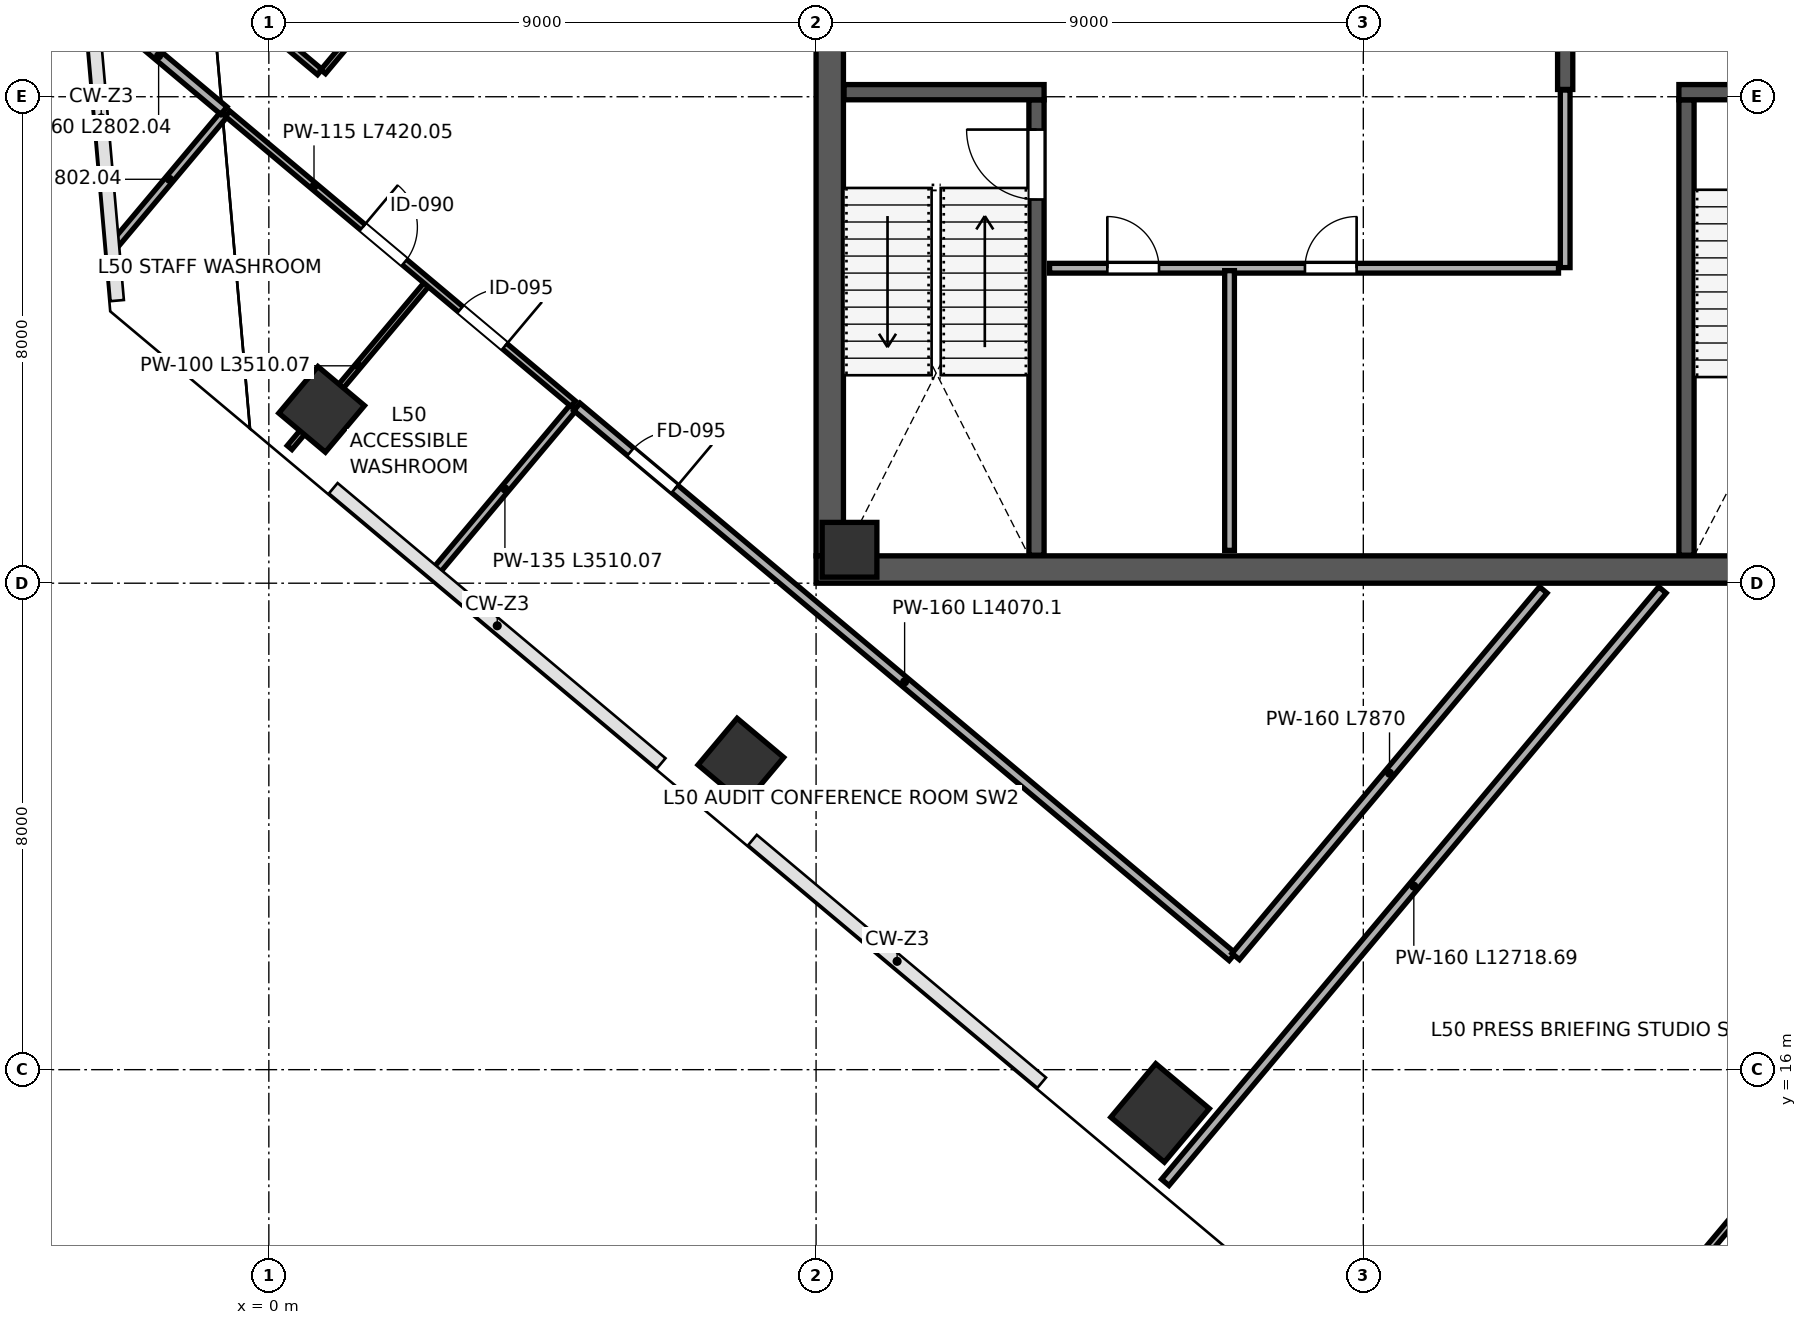
"""IFC4 building model, lengths in metres.
Left out: names, types, materials, properties, quantities, classifications, styles, units other than length and angle.
Written with IfcOpenShell. Run it as: python <this file> out.ifc"""

import sys

from ifc_helpers import new_model, si_unit, direction, frame, frame_2d, origin, origin_2d, place, context, subcontext, project, spatial, rectangle, extrude, clip, halfspace, source, transform, mapped, element, fill, save


model = new_model("IFC4")
c1 = context("Model", 3, precision=1e-05, world=origin(), true_north=direction((0.0, 1.0)))
c2 = subcontext(c1, "Body", "Model", "MODEL_VIEW")
j1 = project(units=[si_unit("LENGTHUNIT", "METRE"), si_unit("PLANEANGLEUNIT", "RADIAN")], contexts=[c1])
p1 = place(None, origin())
s1 = spatial("IfcSite", under=j1, at=p1, CompositionType="ELEMENT")
p2 = place(p1, origin())
s2 = spatial("IfcBuilding", under=s1, at=p2, CompositionType="ELEMENT")
p3 = place(p2, frame((0.0, 0.0, 224.8)))
s3 = spatial("IfcBuildingStorey", under=s2, at=p3, CompositionType="ELEMENT", Elevation=224.8)
m1 = source(origin(), c2, "Body", "SweptSolid", [
    extrude(rectangle(XDim=0.9, YDim=0.9, at=origin_2d()), origin(), (0.0, 0.0, 1.0), 4.198),
])
p4 = place(p3, frame((9.55, 24.55, 0.001), z_axis=(0.0, 0.0, 1.0), x_axis=(1.0, 0.0, 0.0)))
e1 = element("IfcColumn", 1, at=p4, inside=s3, PredefinedType="COLUMN", context=c2, shape_type="MappedRepresentation", body=[
    mapped(m1, transform((0.0, 0.0, 0.0), scale=1.0)),
])
p5 = place(p3, frame((0.868, 26.859, 0.0), z_axis=(-0.047566065754, 0.210357803919, 0.976466621917), x_axis=(0.885612426961, -0.443252303304, 0.138629090847)))
e2 = element("IfcColumn", 2, at=p5, inside=s3, PredefinedType="COLUMN", context=c2, shape_type="Clipping", body=[
    clip(clip(extrude(rectangle(XDim=1.0, YDim=1.0, at=origin_2d()), origin(), (0.0, 0.0, 1.0), 4.301), halfspace(frame((0.0, 0.0, 0.156), z_axis=(0.0, 0.0, -1.0), x_axis=(1.0, 0.0, 0.0)), False)), halfspace(frame((0.0, 0.0, 4.145), z_axis=(0.0, 0.0, 1.0), x_axis=(1.0, 0.0, 0.0)), False)),
])
p6 = place(p3, frame((7.763, 21.074, 0.0), z_axis=(-0.108596865091, 0.142794298121, 0.983776656217), x_axis=(0.992538666329, -0.039617581376, 0.115314539793)))
e3 = element("IfcColumn", 3, at=p6, inside=s3, PredefinedType="COLUMN", context=c2, shape_type="Clipping", body=[
    clip(clip(extrude(rectangle(XDim=1.0, YDim=1.0, at=origin_2d()), origin(), (0.0, 0.0, 1.0), 4.269), halfspace(frame((0.0, 0.0, 0.129), z_axis=(0.0, 0.0, -1.0), x_axis=(1.0, 0.0, 0.0)), False)), halfspace(frame((0.0, 0.0, 4.14), z_axis=(0.0, 0.0, 1.0), x_axis=(1.0, 0.0, 0.0)), False)),
])
p7 = place(p3, frame((14.657, 15.289, 0.0), z_axis=(-0.169056664152, 0.073530221955, 0.982859680099), x_axis=(0.88488053523, 0.450492942198, 0.118501254847)))
e4 = element("IfcColumn", 4, at=p7, inside=s3, PredefinedType="COLUMN", context=c2, shape_type="Clipping", body=[
    clip(clip(extrude(rectangle(XDim=1.15, YDim=1.15, at=origin_2d()), origin(), (0.0, 0.0, 1.0), 4.273), halfspace(frame((0.0, 0.0, 0.153), z_axis=(0.0, 0.0, -1.0), x_axis=(1.0, 0.0, 0.0)), False)), halfspace(frame((0.0, 0.0, 4.121), z_axis=(0.0, 0.0, 1.0), x_axis=(1.0, 0.0, 0.0)), False)),
])
p8 = place(p3, frame((9.225, 24.45, 0.0), z_axis=(0.0, 0.0, 1.0), x_axis=(0.0, 1.0, 0.0)))
e5 = element("IfcWall", 5, at=p8, inside=s3, PredefinedType="SHEAR", context=c2, shape_type="SweptSolid", body=[
    extrude(rectangle(XDim=15.1, YDim=0.45, at=frame_2d((7.55, 0.0))), origin(), (0.0, 0.0, 1.0), 3.96),
])
p9 = place(p8, frame((8.7, 0.0, 0.0)))
e6 = element("IfcOpeningElement", 6, at=p9, cuts=e5, PredefinedType="OPENING", context=c2, shape_type="SweptSolid", body=[
    extrude(rectangle(XDim=1.15, YDim=2.2, at=frame_2d((0.575, 1.1))), frame((0.0, 0.235, 0.0), z_axis=(0.0, -1.0, 0.0), x_axis=(1.0, 0.0, 0.0)), (0.0, 0.0, 1.0), 0.47),
])
p10 = place(p3, frame((9.0, 24.225, 0.0), z_axis=(0.0, 0.0, 1.0), x_axis=(1.0, 0.0, 0.0)))
e7 = element("IfcWall", 7, at=p10, inside=s3, PredefinedType="SHEAR", context=c2, shape_type="SweptSolid", body=[
    extrude(rectangle(XDim=18.0, YDim=0.45, at=frame_2d((9.0, 0.0))), origin(), (0.0, 0.0, 1.0), 3.96),
])
p11 = place(p3, frame((12.625, 24.46, 0.0), z_axis=(0.0, 0.0, 1.0), x_axis=(0.0, 1.0, 0.0)))
e8 = element("IfcWall", 8, at=p11, inside=s3, PredefinedType="SHEAR", context=c2, shape_type="SweptSolid", body=[
    extrude(rectangle(XDim=7.49, YDim=0.25, at=frame_2d((3.745, 0.0))), origin(), (0.0, 0.0, 1.0), 3.96),
])
p12 = place(p11, frame((5.85, 0.0, 0.0)))
e9 = element("IfcOpeningElement", 9, at=p12, cuts=e8, PredefinedType="OPENING", context=c2, shape_type="SweptSolid", body=[
    extrude(rectangle(XDim=1.15, YDim=2.2, at=frame_2d((0.575, 1.1))), frame((0.0, 0.135, 0.0), z_axis=(0.0, -1.0, 0.0), x_axis=(1.0, 0.0, 0.0)), (0.0, 0.0, 1.0), 0.27),
])
p13 = place(p3, frame((9.46, 32.075, 0.0), z_axis=(0.0, 0.0, 1.0), x_axis=(1.0, 0.0, 0.0)))
e10 = element("IfcWall", 10, at=p13, inside=s3, PredefinedType="SHEAR", context=c2, shape_type="SweptSolid", body=[
    extrude(rectangle(XDim=3.29, YDim=0.25, at=frame_2d((1.645, 0.0))), origin(), (0.0, 0.0, 1.0), 3.96),
])
p14 = place(p3, frame((23.315, 24.46, 0.0), z_axis=(0.0, 0.0, 1.0), x_axis=(0.0, 1.0, 0.0)))
e11 = element("IfcWall", 11, at=p14, inside=s3, PredefinedType="SHEAR", context=c2, shape_type="SweptSolid", body=[
    extrude(rectangle(XDim=7.49, YDim=0.25, at=frame_2d((3.745, 0.0))), origin(), (0.0, 0.0, 1.0), 3.96),
])
p15 = place(p3, frame((23.19, 32.075, 0.0), z_axis=(0.0, 0.0, 1.0), x_axis=(1.0, 0.0, 0.0)))
e12 = element("IfcWall", 12, at=p15, inside=s3, PredefinedType="SHEAR", context=c2, shape_type="SweptSolid", body=[
    extrude(rectangle(XDim=3.35, YDim=0.25, at=frame_2d((1.675, 0.0))), origin(), (0.0, 0.0, 1.0), 3.96),
])
p16 = place(p15, frame((0.85, 0.0, 0.0)))
e13 = element("IfcOpeningElement", 13, at=p16, cuts=e12, PredefinedType="OPENING", context=c2, shape_type="SweptSolid", body=[
    extrude(rectangle(XDim=1.15, YDim=2.2, at=frame_2d((0.575, 1.1))), frame((0.0, 0.135, 0.0), z_axis=(0.0, -1.0, 0.0), x_axis=(1.0, 0.0, 0.0)), (0.0, 0.0, 1.0), 0.27),
])
p17 = place(p3, frame((21.32, 32.12, 0.0), z_axis=(0.0, 0.0, 1.0), x_axis=(0.0, 1.0, 0.0)))
e14 = element("IfcWall", 14, at=p17, inside=s3, PredefinedType="SHEAR", context=c2, shape_type="SweptSolid", body=[
    extrude(rectangle(XDim=7.42, YDim=0.25, at=frame_2d((3.71, 0.0))), origin(), (0.0, 0.0, 1.0), 3.96),
])
p18 = place(p17, frame((1.4, 0.0, 0.0)))
e15 = element("IfcOpeningElement", 15, at=p18, cuts=e14, PredefinedType="OPENING", context=c2, shape_type="SweptSolid", body=[
    extrude(rectangle(XDim=1.15, YDim=2.2, at=frame_2d((0.575, 1.1))), frame((0.0, 0.135, 0.0), z_axis=(0.0, -1.0, 0.0), x_axis=(1.0, 0.0, 0.0)), (0.0, 0.0, 1.0), 0.27),
])
p19 = place(p3, frame((12.84, 29.18, 0.0), z_axis=(0.0, 0.0, 1.0), x_axis=(1.0, 0.0, 0.0)))
e16 = element("IfcWall", 16, at=p19, inside=s3, PredefinedType="PARTITIONING", context=c2, shape_type="SweptSolid", body=[
    extrude(rectangle(XDim=8.37, YDim=0.16, at=frame_2d((4.185, 0.0))), origin(), (0.0, 0.0, 1.0), 3.96),
])
p20 = place(p19, frame((0.95, 0.0, 0.0)))
e17 = element("IfcOpeningElement", 17, at=p20, cuts=e16, PredefinedType="OPENING", context=c2, shape_type="SweptSolid", body=[
    extrude(rectangle(XDim=0.85, YDim=2.1, at=frame_2d((0.425, 1.05))), frame((0.0, 0.09, 0.0), z_axis=(0.0, -1.0, 0.0), x_axis=(1.0, 0.0, 0.0)), (0.0, 0.0, 1.0), 0.18),
])
p21 = place(p19, frame((4.2, 0.0, 0.0)))
e18 = element("IfcOpeningElement", 18, at=p21, cuts=e16, PredefinedType="OPENING", context=c2, shape_type="SweptSolid", body=[
    extrude(rectangle(XDim=0.85, YDim=2.1, at=frame_2d((0.425, 1.05))), frame((0.0, 0.09, 0.0), z_axis=(0.0, -1.0, 0.0), x_axis=(1.0, 0.0, 0.0)), (0.0, 0.0, 1.0), 0.18),
])
p22 = place(p3, frame((15.8, 24.54, 0.0), z_axis=(0.0, 0.0, 1.0), x_axis=(0.0, 1.0, 0.0)))
e19 = element("IfcWall", 19, at=p22, inside=s3, PredefinedType="PARTITIONING", context=c2, shape_type="SweptSolid", body=[
    extrude(rectangle(XDim=4.6, YDim=0.16, at=frame_2d((2.3, 0.0))), origin(), (0.0, 0.0, 1.0), 3.96),
])
p23 = place(p3, frame((21.32, 29.19, 0.0), z_axis=(0.0, 0.0, 1.0), x_axis=(0.0, 1.0, 0.0)))
e20 = element("IfcWall", 20, at=p23, inside=s3, PredefinedType="PARTITIONING", context=c2, shape_type="SweptSolid", body=[
    extrude(rectangle(XDim=2.92, YDim=0.16, at=frame_2d((1.46, 0.0))), origin(), (0.0, 0.0, 1.0), 3.96),
])
p24 = place(p3, frame((-2.536, 29.569, 0.0), z_axis=(0.0, 0.0, 1.0), x_axis=(0.642777228426, 0.766053153911, 0.0)))
e21 = element("IfcWall", 21, at=p24, inside=s3, PredefinedType="PARTITIONING", context=c2, shape_type="SweptSolid", body=[
    extrude(rectangle(XDim=2.802, YDim=0.135, at=frame_2d((1.401, 0.0))), origin(), (0.0, 0.0, 1.0), 3.96),
])
p25 = place(p3, frame((-2.886, 33.573, 0.0), z_axis=(0.0, 0.0, 1.0), x_axis=(0.766060058075, -0.642769000048, 0.0)))
e22 = element("IfcWall", 22, at=p25, inside=s3, PredefinedType="PARTITIONING", context=c2, shape_type="SweptSolid", body=[
    extrude(rectangle(XDim=2.802, YDim=0.16, at=frame_2d((1.401, 0.0))), origin(), (0.0, 0.0, 1.0), 3.96),
])
p26 = place(p3, frame((0.341, 26.231, 0.0), z_axis=(0.0, 0.0, 1.0), x_axis=(0.642794003744, 0.766039077822, 0.0)))
e23 = element("IfcWall", 23, at=p26, inside=s3, PredefinedType="PARTITIONING", context=c2, shape_type="SweptSolid", body=[
    extrude(rectangle(XDim=3.51, YDim=0.1, at=frame_2d((1.755, 0.0))), origin(), (0.0, 0.0, 1.0), 3.195),
])
p27 = place(p3, frame((2.754, 24.206, 0.0), z_axis=(0.0, 0.0, 1.0), x_axis=(0.642753187144, 0.766073325744, 0.0)))
e24 = element("IfcWall", 24, at=p27, inside=s3, PredefinedType="PARTITIONING", context=c2, shape_type="SweptSolid", body=[
    extrude(rectangle(XDim=3.51, YDim=0.135, at=frame_2d((1.755, 0.0))), origin(), (0.0, 0.0, 1.0), 3.195),
])
p28 = place(p3, frame((-0.678, 31.721, 0.0), z_axis=(0.0, 0.0, 1.0), x_axis=(0.766043108328, -0.642789200425, 0.0)))
e25 = element("IfcWall", 25, at=p28, inside=s3, PredefinedType="PARTITIONING", context=c2, shape_type="SweptSolid", body=[
    extrude(rectangle(XDim=7.42, YDim=0.115, at=frame_2d((3.71, 0.0))), origin(), (0.0, 0.0, 1.0), 3.96),
])
p29 = place(p28, frame((2.9, 0.0, 0.0)))
e26 = element("IfcOpeningElement", 26, at=p29, cuts=e25, PredefinedType="OPENING", context=c2, shape_type="SweptSolid", body=[
    extrude(rectangle(XDim=0.9, YDim=2.15, at=frame_2d((0.45, 1.075))), frame((0.0, 0.067, 0.0), z_axis=(0.0, -1.0, 0.0), x_axis=(1.0, 0.0, 0.0)), (0.0, 0.0, 1.0), 0.135),
])
p30 = place(p28, frame((5.0, 0.0, 0.0)))
e27 = element("IfcOpeningElement", 27, at=p30, cuts=e25, PredefinedType="OPENING", context=c2, shape_type="SweptSolid", body=[
    extrude(rectangle(XDim=0.95, YDim=2.15, at=frame_2d((0.475, 1.075))), frame((0.0, 0.067, 0.0), z_axis=(0.0, -1.0, 0.0), x_axis=(1.0, 0.0, 0.0)), (0.0, 0.0, 1.0), 0.135),
])
p31 = place(p3, frame((5.067, 26.9, 0.0), z_axis=(0.0, 0.0, 1.0), x_axis=(0.766049317662, -0.642781800387, 0.0)))
e28 = element("IfcWall", 28, at=p31, inside=s3, PredefinedType="PARTITIONING", context=c2, shape_type="SweptSolid", body=[
    extrude(rectangle(XDim=14.07, YDim=0.16, at=frame_2d((7.035, 0.0))), origin(), (0.0, 0.0, 1.0), 3.96),
])
p32 = place(p31, frame((1.15, 0.0, 0.0)))
e29 = element("IfcOpeningElement", 29, at=p32, cuts=e28, PredefinedType="OPENING", context=c2, shape_type="SweptSolid", body=[
    extrude(rectangle(XDim=0.95, YDim=2.15, at=frame_2d((0.475, 1.075))), frame((0.0, 0.09, 0.0), z_axis=(0.0, -1.0, 0.0), x_axis=(1.0, 0.0, 0.0)), (0.0, 0.0, 1.0), 0.18),
])
p33 = place(p3, frame((15.902, 17.861, 0.0), z_axis=(0.0, 0.0, 1.0), x_axis=(0.642774387864, 0.766055537351, 0.0)))
e30 = element("IfcWall", 30, at=p33, inside=s3, PredefinedType="PARTITIONING", context=c2, shape_type="SweptSolid", body=[
    extrude(rectangle(XDim=7.87, YDim=0.16, at=frame_2d((3.935, 0.0))), origin(), (0.0, 0.0, 1.0), 3.96),
])
p34 = place(p3, frame((-2.556, 35.254, 0.0), z_axis=(0.0, 0.0, 1.0), x_axis=(0.76603046424, -0.642804268698, 0.0)))
e31 = element("IfcWall", 31, at=p34, inside=s3, PredefinedType="PARTITIONING", context=c2, shape_type="SweptSolid", body=[
    extrude(rectangle(XDim=4.43, YDim=0.115, at=frame_2d((2.215, 0.0))), origin(), (0.0, 0.0, 1.0), 3.96),
])
p35 = place(p3, frame((0.894, 32.412, 0.0), z_axis=(0.0, 0.0, 1.0), x_axis=(0.642782006196, 0.766049144971, 0.0)))
e32 = element("IfcWall", 32, at=p35, inside=s3, PredefinedType="PARTITIONING", context=c2, shape_type="SweptSolid", body=[
    extrude(rectangle(XDim=28.95, YDim=0.1, at=frame_2d((14.475, 0.0))), origin(), (0.0, 0.0, 1.0), 3.96),
])
p36 = place(p35, frame((2.2, 0.0, 0.0)))
e33 = element("IfcOpeningElement", 33, at=p36, cuts=e32, PredefinedType="OPENING", context=c2, shape_type="SweptSolid", body=[
    extrude(rectangle(XDim=0.95, YDim=2.15, at=frame_2d((0.475, 1.075))), frame((0.0, 0.06, 0.0), z_axis=(0.0, -1.0, 0.0), x_axis=(1.0, 0.0, 0.0)), (0.0, 0.0, 1.0), 0.12),
])
p37 = place(p3, frame((14.743, 14.146, 0.0), z_axis=(0.0, 0.0, 1.0), x_axis=(0.642789996784, 0.7660424401, 0.0)))
e34 = element("IfcWall", 34, at=p37, inside=s3, PredefinedType="PARTITIONING", context=c2, shape_type="SweptSolid", body=[
    extrude(rectangle(XDim=12.719, YDim=0.16, at=frame_2d((6.359, 0.0))), origin(), (0.0, 0.0, 1.0), 3.96),
])
p38 = place(p3, frame((22.969, 12.204, 0.0), z_axis=(0.0, 0.0, 1.0), x_axis=(0.642787758903, 0.766044317912, 0.0)))
e35 = element("IfcWall", 35, at=p38, inside=s3, PredefinedType="PARTITIONING", context=c2, shape_type="SweptSolid", body=[
    extrude(rectangle(XDim=17.28, YDim=0.115, at=frame_2d((8.64, 0.0))), origin(), (0.0, 0.0, 1.0), 3.96),
])
m2 = source(origin(), c2, "Body", "SweptSolid", [
    extrude(rectangle(XDim=1.15, YDim=2.2, at=frame_2d((0.575, 1.1))), frame((0.0, 0.025, 0.0), z_axis=(0.0, -1.0, 0.0), x_axis=(1.0, 0.0, 0.0)), (0.0, 0.0, 1.0), 0.05),
])
p39 = place(p12, origin())
e36 = element("IfcDoor", 36, at=p39, inside=s3, OperationType="SINGLE_SWING_RIGHT", PredefinedType="DOOR", context=c2, shape_type="MappedRepresentation", body=[
    mapped(m2, transform((0.0, 0.0, 0.0), scale=1.0)),
])
fill(e9, e36)
m3 = source(origin(), c2, "Body", "SweptSolid", [
    extrude(rectangle(XDim=0.85, YDim=2.1, at=frame_2d((0.425, 1.05))), frame((0.0, 0.025, 0.0), z_axis=(0.0, -1.0, 0.0), x_axis=(1.0, 0.0, 0.0)), (0.0, 0.0, 1.0), 0.05),
])
p40 = place(p20, origin())
e37 = element("IfcDoor", 37, at=p40, inside=s3, OperationType="SINGLE_SWING_LEFT", PredefinedType="DOOR", context=c2, shape_type="MappedRepresentation", body=[
    mapped(m3, transform((0.0, 0.0, 0.0), scale=1.0)),
])
fill(e17, e37)
p41 = place(p21, origin())
e38 = element("IfcDoor", 38, at=p41, inside=s3, OperationType="SINGLE_SWING_RIGHT", PredefinedType="DOOR", context=c2, shape_type="MappedRepresentation", body=[
    mapped(m3, transform((0.0, 0.0, 0.0), scale=1.0)),
])
fill(e18, e38)
m4 = source(origin(), c2, "Body", "SweptSolid", [
    extrude(rectangle(XDim=0.9, YDim=2.15, at=frame_2d((0.45, 1.075))), frame((0.0, 0.025, 0.0), z_axis=(0.0, -1.0, 0.0), x_axis=(1.0, 0.0, 0.0)), (0.0, 0.0, 1.0), 0.05),
])
p42 = place(p29, origin())
e39 = element("IfcDoor", 39, at=p42, inside=s3, OperationType="SINGLE_SWING_LEFT", PredefinedType="DOOR", context=c2, shape_type="MappedRepresentation", body=[
    mapped(m4, transform((0.0, 0.0, 0.0), scale=1.0)),
])
fill(e26, e39)
m5 = source(origin(), c2, "Body", "SweptSolid", [
    extrude(rectangle(XDim=0.95, YDim=2.15, at=frame_2d((0.475, 1.075))), frame((0.0, 0.025, 0.0), z_axis=(0.0, -1.0, 0.0), x_axis=(1.0, 0.0, 0.0)), (0.0, 0.0, 1.0), 0.05),
])
p43 = place(p30, origin())
e40 = element("IfcDoor", 40, at=p43, inside=s3, OperationType="SINGLE_SWING_RIGHT", PredefinedType="DOOR", context=c2, shape_type="MappedRepresentation", body=[
    mapped(m5, transform((0.0, 0.0, 0.0), scale=1.0)),
])
fill(e27, e40)
m6 = source(origin(), c2, "Body", "SweptSolid", [
    extrude(rectangle(XDim=0.95, YDim=2.15, at=frame_2d((0.475, 1.075))), frame((0.0, 0.025, 0.0), z_axis=(0.0, -1.0, 0.0), x_axis=(1.0, 0.0, 0.0)), (0.0, 0.0, 1.0), 0.05),
])
p44 = place(p32, origin())
e41 = element("IfcDoor", 41, at=p44, inside=s3, OperationType="SINGLE_SWING_RIGHT", PredefinedType="DOOR", context=c2, shape_type="MappedRepresentation", body=[
    mapped(m6, transform((0.0, 0.0, 0.0), scale=1.0)),
])
fill(e29, e41)
save(model, sys.argv[1])
